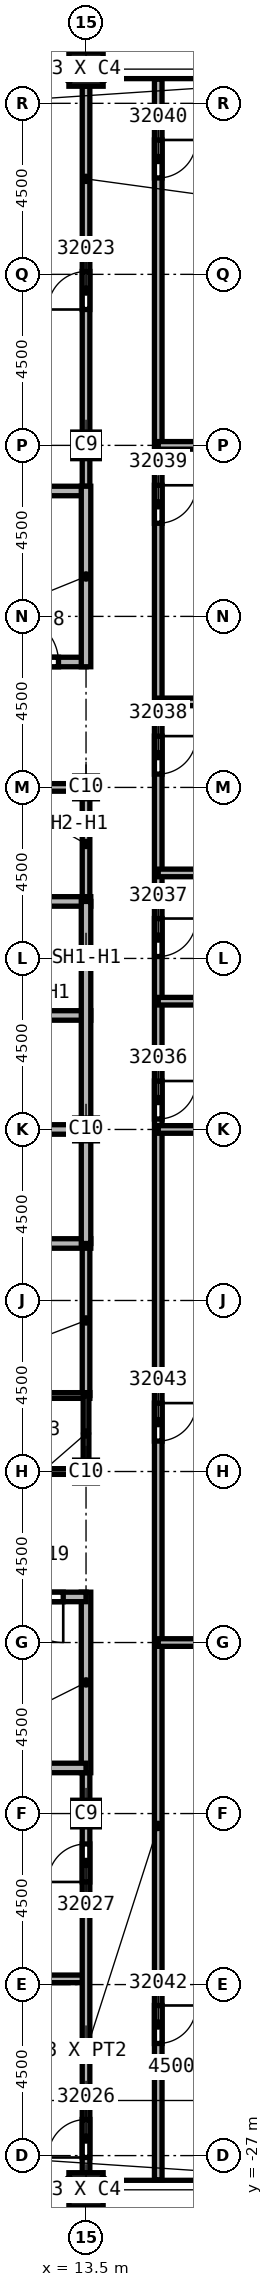
"""IFC4 building model, lengths in metres.
Left out: names, types, materials, properties, quantities, classifications, styles, units other than length and angle.
Written with IfcOpenShell. Run it as: python <this file> out.ifc"""

import sys

from ifc_helpers import new_model, si_unit, direction, frame, frame_2d, origin, origin_2d, place, context, subcontext, project, spatial, rectangle, extrude, element, fill, save


model = new_model("IFC4")
c1 = context("Model", 3, precision=1e-05, world=origin(), true_north=direction((0.0, 1.0)))
c2 = subcontext(c1, "Body", "Model", "MODEL_VIEW")
j1 = project(units=[si_unit("LENGTHUNIT", "METRE"), si_unit("PLANEANGLEUNIT", "RADIAN")], contexts=[c1])
p1 = place(None, origin())
s1 = spatial("IfcSite", under=j1, at=p1, CompositionType="ELEMENT")
p2 = place(p1, origin())
s2 = spatial("IfcBuilding", under=s1, at=p2, CompositionType="ELEMENT")
p3 = place(p2, frame((0.0, 0.0, 356.0)))
s3 = spatial("IfcBuildingStorey", under=s2, at=p3, CompositionType="ELEMENT", Elevation=356.0)
for number, where, z_axis, x_axis in (
    (1, (13.5, 18.0, 0.0), (0.0, 0.0, 1.0), (1.0, 0.0, 0.0)),
    (2, (13.5, -18.0, 0.0), (0.0, 0.0, 1.0), (1.0, 0.0, 0.0)),
):
    element("IfcColumn", number, at=place(p3, frame(where, z_axis=z_axis, x_axis=x_axis)), inside=s3, PredefinedType="COLUMN", context=c2, shape_type="SweptSolid", body=[
        extrude(rectangle(XDim=0.7, YDim=0.7, at=origin_2d()), origin(), (0.0, 0.0, 1.0), 4.6),
    ])
for number, where, z_axis, x_axis in (
    (3, (13.5, 0.0, 0.0), (0.0, 0.0, 1.0), (1.0, 0.0, 0.0)),
    (4, (13.5, 9.0, 0.0), (0.0, 0.0, 1.0), (1.0, 0.0, 0.0)),
    (5, (13.5, -9.0, 0.0), (0.0, 0.0, 1.0), (1.0, 0.0, 0.0)),
):
    element("IfcColumn", number, at=place(p3, frame(where, z_axis=z_axis, x_axis=x_axis)), inside=s3, PredefinedType="COLUMN", context=c2, shape_type="SweptSolid", body=[
        extrude(rectangle(XDim=0.6, YDim=0.6, at=origin_2d()), origin(), (0.0, 0.0, 1.0), 4.6),
    ])
for number, where, z_axis, x_axis in (
    (6, (13.5, 27.9, 0.0), (0.0, 0.0, 1.0), (1.0, 0.0, 0.0)),
    (7, (13.5, -27.9, 0.0), (0.0, 0.0, 1.0), (1.0, 0.0, 0.0)),
):
    element("IfcColumn", number, at=place(p3, frame(where, z_axis=z_axis, x_axis=x_axis)), inside=s3, PredefinedType="COLUMN", context=c2, shape_type="SweptSolid", body=[
        extrude(rectangle(XDim=0.9, YDim=0.9, at=origin_2d()), origin(), (0.0, 0.0, 1.0), 4.6),
    ])
p4 = place(p3, frame((3.0, -22.35, 0.0), z_axis=(0.0, 0.0, 1.0), x_axis=(1.0, 0.0, 0.0)))
e8 = element("IfcWall", 8, at=p4, inside=s3, PredefinedType="PARTITIONING", context=c2, shape_type="SweptSolid", body=[
    extrude(rectangle(XDim=10.5, YDim=0.2, at=frame_2d((5.25, 0.0))), origin(), (0.0, 0.0, 1.0), 4.15),
])
p5 = place(p3, frame((13.5, -27.45, 0.0), z_axis=(0.0, 0.0, 1.0), x_axis=(0.0, 1.0, 0.0)))
e9 = element("IfcWall", 9, at=p5, inside=s3, PredefinedType="PARTITIONING", context=c2, shape_type="SweptSolid", body=[
    extrude(rectangle(XDim=10.775, YDim=0.2, at=frame_2d((5.387, 0.0))), origin(), (0.0, 0.0, 1.0), 4.15),
])
p6 = place(p5, frame((0.4, 0.0, 0.0)))
e10 = element("IfcOpeningElement", 10, at=p6, cuts=e9, PredefinedType="OPENING", context=c2, shape_type="SweptSolid", body=[
    extrude(rectangle(XDim=1.0, YDim=2.1, at=frame_2d((0.5, 1.05))), frame((0.0, 0.1, 0.0), z_axis=(0.0, -1.0, 0.0), x_axis=(1.0, 0.0, 0.0)), (0.0, 0.0, 1.0), 0.2),
])
p7 = place(p5, frame((7.65, 0.0, 0.0)))
e11 = element("IfcOpeningElement", 11, at=p7, cuts=e9, PredefinedType="OPENING", context=c2, shape_type="SweptSolid", body=[
    extrude(rectangle(XDim=1.0, YDim=2.1, at=frame_2d((0.5, 1.05))), frame((0.0, 0.1, 0.0), z_axis=(0.0, -1.0, 0.0), x_axis=(1.0, 0.0, 0.0)), (0.0, 0.0, 1.0), 0.2),
])
p8 = place(p3, frame((13.5, 16.675, 0.0), z_axis=(0.0, 0.0, 1.0), x_axis=(0.0, 1.0, 0.0)))
e12 = element("IfcWall", 12, at=p8, inside=s3, PredefinedType="PARTITIONING", context=c2, shape_type="SweptSolid", body=[
    extrude(rectangle(XDim=10.775, YDim=0.2, at=frame_2d((5.387, 0.0))), origin(), (0.0, 0.0, 1.0), 4.15),
])
p9 = place(p8, frame((4.9, 0.0, 0.0)))
e13 = element("IfcOpeningElement", 13, at=p9, cuts=e12, PredefinedType="OPENING", context=c2, shape_type="SweptSolid", body=[
    extrude(rectangle(XDim=1.0, YDim=2.1, at=frame_2d((0.5, 1.05))), frame((0.0, 0.1, 0.0), z_axis=(0.0, -1.0, 0.0), x_axis=(1.0, 0.0, 0.0)), (0.0, 0.0, 1.0), 0.2),
])
p10 = place(p3, frame((15.4, 27.636, 0.0), z_axis=(0.0, 0.0, 1.0), x_axis=(0.0, -1.0, 0.0)))
e14 = element("IfcWall", 14, at=p10, inside=s3, PredefinedType="PARTITIONING", context=c2, shape_type="SweptSolid", body=[
    extrude(rectangle(XDim=55.272, YDim=0.2, at=frame_2d((27.636, 0.0))), origin(), (0.0, 0.0, 1.0), 4.15),
])
p11 = place(p10, frame((26.361, 0.0, 0.0)))
e15 = element("IfcOpeningElement", 15, at=p11, cuts=e14, PredefinedType="OPENING", context=c2, shape_type="SweptSolid", body=[
    extrude(rectangle(XDim=1.0, YDim=2.1, at=frame_2d((0.5, 1.05))), frame((0.0, 0.1, 0.0), z_axis=(0.0, -1.0, 0.0), x_axis=(1.0, 0.0, 0.0)), (0.0, 0.0, 1.0), 0.2),
])
p12 = place(p10, frame((22.086, 0.0, 0.0)))
e16 = element("IfcOpeningElement", 16, at=p12, cuts=e14, PredefinedType="OPENING", context=c2, shape_type="SweptSolid", body=[
    extrude(rectangle(XDim=1.0, YDim=2.1, at=frame_2d((0.5, 1.05))), frame((0.0, 0.1, 0.0), z_axis=(0.0, -1.0, 0.0), x_axis=(1.0, 0.0, 0.0)), (0.0, 0.0, 1.0), 0.2),
])
p13 = place(p10, frame((17.286, 0.0, 0.0)))
e17 = element("IfcOpeningElement", 17, at=p13, cuts=e14, PredefinedType="OPENING", context=c2, shape_type="SweptSolid", body=[
    extrude(rectangle(XDim=1.0, YDim=2.1, at=frame_2d((0.5, 1.05))), frame((0.0, 0.1, 0.0), z_axis=(0.0, -1.0, 0.0), x_axis=(1.0, 0.0, 0.0)), (0.0, 0.0, 1.0), 0.2),
])
p14 = place(p10, frame((10.686, 0.0, 0.0)))
e18 = element("IfcOpeningElement", 18, at=p14, cuts=e14, PredefinedType="OPENING", context=c2, shape_type="SweptSolid", body=[
    extrude(rectangle(XDim=1.0, YDim=2.1, at=frame_2d((0.5, 1.05))), frame((0.0, 0.1, 0.0), z_axis=(0.0, -1.0, 0.0), x_axis=(1.0, 0.0, 0.0)), (0.0, 0.0, 1.0), 0.2),
])
p15 = place(p10, frame((1.6, 0.0, 0.0)))
e19 = element("IfcOpeningElement", 19, at=p15, cuts=e14, PredefinedType="OPENING", context=c2, shape_type="SweptSolid", body=[
    extrude(rectangle(XDim=1.0, YDim=2.1, at=frame_2d((0.5, 1.05))), frame((0.0, 0.1, 0.0), z_axis=(0.0, -1.0, 0.0), x_axis=(1.0, 0.0, 0.0)), (0.0, 0.0, 1.0), 0.2),
])
p16 = place(p10, frame((50.686, 0.0, 0.0)))
e20 = element("IfcOpeningElement", 20, at=p16, cuts=e14, PredefinedType="OPENING", context=c2, shape_type="SweptSolid", body=[
    extrude(rectangle(XDim=1.0, YDim=2.1, at=frame_2d((0.5, 1.05))), frame((0.0, 0.1, 0.0), z_axis=(0.0, -1.0, 0.0), x_axis=(1.0, 0.0, 0.0)), (0.0, 0.0, 1.0), 0.2),
])
p17 = place(p10, frame((34.836, 0.0, 0.0)))
e21 = element("IfcOpeningElement", 21, at=p17, cuts=e14, PredefinedType="OPENING", context=c2, shape_type="SweptSolid", body=[
    extrude(rectangle(XDim=1.0, YDim=2.1, at=frame_2d((0.5, 1.05))), frame((0.0, 0.1, 0.0), z_axis=(0.0, -1.0, 0.0), x_axis=(1.0, 0.0, 0.0)), (0.0, 0.0, 1.0), 0.2),
])
p18 = place(p3, frame((15.4, -13.5, 0.0), z_axis=(0.0, 0.0, 1.0), x_axis=(1.0, 0.0, 0.0)))
e22 = element("IfcWall", 22, at=p18, inside=s3, PredefinedType="PARTITIONING", context=c2, shape_type="SweptSolid", body=[
    extrude(rectangle(XDim=11.15, YDim=0.2, at=frame_2d((5.575, 0.0))), origin(), (0.0, 0.0, 1.0), 4.15),
])
for number, where, z_axis, x_axis in (
    (23, (15.4, 3.375, 0.0), (0.0, 0.0, 1.0), (1.0, 0.0, 0.0)),
    (24, (15.4, 6.75, 0.0), (0.0, 0.0, 1.0), (1.0, 0.0, 0.0)),
    (25, (15.4, 11.25, 0.0), (0.0, 0.0, 1.0), (1.0, 0.0, 0.0)),
):
    element("IfcWall", number, at=place(p3, frame(where, z_axis=z_axis, x_axis=x_axis)), inside=s3, PredefinedType="PARTITIONING", context=c2, shape_type="SweptSolid", body=[
        extrude(rectangle(XDim=11.336, YDim=0.2, at=frame_2d((5.668, 0.0))), origin(), (0.0, 0.0, 1.0), 4.15),
    ])
p19 = place(p3, frame((15.4, 18.0, 0.0), z_axis=(0.0, 0.0, 1.0), x_axis=(1.0, 0.0, 0.0)))
e26 = element("IfcWall", 26, at=p19, inside=s3, PredefinedType="PARTITIONING", context=c2, shape_type="SweptSolid", body=[
    extrude(rectangle(XDim=4.6, YDim=0.2, at=frame_2d((2.3, 0.0))), origin(), (0.0, 0.0, 1.0), 4.15),
])
p20 = place(p3, frame((26.55, 0.0, 0.0), z_axis=(0.0, 0.0, 1.0), x_axis=(-1.0, 0.0, 0.0)))
e27 = element("IfcWall", 27, at=p20, inside=s3, PredefinedType="PARTITIONING", context=c2, shape_type="SweptSolid", body=[
    extrude(rectangle(XDim=11.15, YDim=0.2, at=frame_2d((5.575, 0.0))), origin(), (0.0, 0.0, 1.0), 4.15),
])
p21 = place(p3, frame((10.5, 9.0, 0.0), z_axis=(0.0, 0.0, 1.0), x_axis=(1.0, 0.0, 0.0)))
e28 = element("IfcWall", 28, at=p21, inside=s3, PredefinedType="SOLIDWALL", context=c2, shape_type="SweptSolid", body=[
    extrude(rectangle(XDim=3.0, YDim=0.2, at=frame_2d((1.5, 0.0))), origin(), (0.0, 0.0, 1.0), 3.838),
])
p22 = place(p3, frame((13.5, -3.0, 0.0), z_axis=(0.0, 0.0, 1.0), x_axis=(0.0, -1.0, 0.0)))
e29 = element("IfcWall", 29, at=p22, inside=s3, PredefinedType="SOLIDWALL", context=c2, shape_type="SweptSolid", body=[
    extrude(rectangle(XDim=4.0, YDim=0.2, at=frame_2d((2.0, 0.0))), origin(), (0.0, 0.0, 1.0), 3.838),
])
p23 = place(p3, frame((13.5, 9.1, 0.0), z_axis=(0.0, 0.0, 1.0), x_axis=(0.0, -1.0, 0.0)))
e30 = element("IfcWall", 30, at=p23, inside=s3, PredefinedType="SOLIDWALL", context=c2, shape_type="SweptSolid", body=[
    extrude(rectangle(XDim=3.1, YDim=0.2, at=frame_2d((1.55, 0.0))), origin(), (0.0, 0.0, 1.0), 3.838),
])
p24 = place(p3, frame((7.5, -3.0, 0.0), z_axis=(0.0, 0.0, 1.0), x_axis=(1.0, 0.0, 0.0)))
e31 = element("IfcWall", 31, at=p24, inside=s3, PredefinedType="SOLIDWALL", context=c2, shape_type="SweptSolid", body=[
    extrude(rectangle(XDim=6.125, YDim=0.25, at=frame_2d((3.062, 0.0))), origin(), (0.0, 0.0, 1.0), 4.15),
])
p25 = place(p24, frame((0.25, 0.0, 0.0)))
e32 = element("IfcOpeningElement", 32, at=p25, cuts=e31, PredefinedType="OPENING", context=c2, shape_type="SweptSolid", body=[
    extrude(rectangle(XDim=1.1, YDim=2.1, at=frame_2d((0.55, 1.05))), frame((0.0, 0.125, 0.0), z_axis=(0.0, -1.0, 0.0), x_axis=(1.0, 0.0, 0.0)), (0.0, 0.0, 1.0), 0.25),
])
p26 = place(p3, frame((7.5, 3.0, 0.0), z_axis=(0.0, 0.0, 1.0), x_axis=(1.0, 0.0, 0.0)))
e33 = element("IfcWall", 33, at=p26, inside=s3, PredefinedType="SOLIDWALL", context=c2, shape_type="SweptSolid", body=[
    extrude(rectangle(XDim=6.125, YDim=0.25, at=frame_2d((3.062, 0.0))), origin(), (0.0, 0.0, 1.0), 4.15),
])
p27 = place(p26, frame((0.25, 0.0, 0.0)))
e34 = element("IfcOpeningElement", 34, at=p27, cuts=e33, PredefinedType="OPENING", context=c2, shape_type="SweptSolid", body=[
    extrude(rectangle(XDim=1.1, YDim=2.1, at=frame_2d((0.55, 1.05))), frame((0.0, 0.125, 0.0), z_axis=(0.0, -1.0, 0.0), x_axis=(1.0, 0.0, 0.0)), (0.0, 0.0, 1.0), 0.25),
])
for number, where, z_axis, x_axis in (
    (35, (10.5, 0.0, 0.0), (0.0, 0.0, 1.0), (1.0, 0.0, 0.0)),
    (36, (10.5, 6.0, 0.0), (0.0, 0.0, 1.0), (1.0, 0.0, 0.0)),
):
    element("IfcWall", number, at=place(p3, frame(where, z_axis=z_axis, x_axis=x_axis)), inside=s3, PredefinedType="SOLIDWALL", context=c2, shape_type="SweptSolid", body=[
        extrude(rectangle(XDim=3.125, YDim=0.25, at=frame_2d((1.562, 0.0))), origin(), (0.0, 0.0, 1.0), 4.15),
    ])
p28 = place(p3, frame((13.5, 6.0, 0.0), z_axis=(0.0, 0.0, 1.0), x_axis=(0.0, -1.0, 0.0)))
e37 = element("IfcWall", 37, at=p28, inside=s3, PredefinedType="SOLIDWALL", context=c2, shape_type="SweptSolid", body=[
    extrude(rectangle(XDim=9.0, YDim=0.25, at=frame_2d((4.5, 0.0))), origin(), (0.0, 0.0, 1.0), 3.838),
])
p29 = place(p3, frame((4.375, 12.3, 0.0), z_axis=(0.0, 0.0, 1.0), x_axis=(1.0, 0.0, 0.0)))
e38 = element("IfcWall", 38, at=p29, inside=s3, PredefinedType="SOLIDWALL", context=c2, shape_type="SweptSolid", body=[
    extrude(rectangle(XDim=9.125, YDim=0.25, at=frame_2d((4.562, 0.0))), origin(), (0.0, 0.0, 1.0), 4.15),
])
p30 = place(p29, frame((7.2, 0.0, 0.0)))
e39 = element("IfcOpeningElement", 39, at=p30, cuts=e38, PredefinedType="OPENING", context=c2, shape_type="SweptSolid", body=[
    extrude(rectangle(XDim=1.2, YDim=2.1, at=frame_2d((0.6, 1.05))), frame((0.0, 0.125, 0.0), z_axis=(0.0, -1.0, 0.0), x_axis=(1.0, 0.0, 0.0)), (0.0, 0.0, 1.0), 0.25),
])
p31 = place(p3, frame((4.4, 16.8, 0.0), z_axis=(0.0, 0.0, 1.0), x_axis=(1.0, 0.0, 0.0)))
e40 = element("IfcWall", 40, at=p31, inside=s3, PredefinedType="SOLIDWALL", context=c2, shape_type="SweptSolid", body=[
    extrude(rectangle(XDim=9.1, YDim=0.25, at=frame_2d((4.55, 0.0))), origin(), (0.0, 0.0, 1.0), 4.15),
])
p32 = place(p3, frame((13.5, -16.925, 0.0), z_axis=(0.0, 0.0, 1.0), x_axis=(0.0, 1.0, 0.0)))
e41 = element("IfcWall", 41, at=p32, inside=s3, PredefinedType="SOLIDWALL", context=c2, shape_type="SweptSolid", body=[
    extrude(rectangle(XDim=4.75, YDim=0.25, at=frame_2d((2.375, 0.0))), origin(), (0.0, 0.0, 1.0), 4.15),
])
p33 = place(p3, frame((13.5, -16.8, 0.0), z_axis=(0.0, 0.0, 1.0), x_axis=(-1.0, 0.0, 0.0)))
e42 = element("IfcWall", 42, at=p33, inside=s3, PredefinedType="SOLIDWALL", context=c2, shape_type="SweptSolid", body=[
    extrude(rectangle(XDim=9.1, YDim=0.25, at=frame_2d((4.55, 0.0))), origin(), (0.0, 0.0, 1.0), 4.15),
])
p34 = place(p3, frame((13.5, -12.3, 0.0), z_axis=(0.0, 0.0, 1.0), x_axis=(-1.0, 0.0, 0.0)))
e43 = element("IfcWall", 43, at=p34, inside=s3, PredefinedType="SOLIDWALL", context=c2, shape_type="SweptSolid", body=[
    extrude(rectangle(XDim=9.125, YDim=0.25, at=frame_2d((4.562, 0.0))), origin(), (0.0, 0.0, 1.0), 4.15),
])
p35 = place(p34, frame((0.6, 0.0, 0.0)))
e44 = element("IfcOpeningElement", 44, at=p35, cuts=e43, PredefinedType="OPENING", context=c2, shape_type="SweptSolid", body=[
    extrude(rectangle(XDim=1.2, YDim=2.1, at=frame_2d((0.6, 1.05))), frame((0.0, 0.125, 0.0), z_axis=(0.0, -1.0, 0.0), x_axis=(1.0, 0.0, 0.0)), (0.0, 0.0, 1.0), 0.25),
])
p36 = place(p3, frame((13.5, 12.175, 0.0), z_axis=(0.0, 0.0, 1.0), x_axis=(0.0, 1.0, 0.0)))
e45 = element("IfcWall", 45, at=p36, inside=s3, PredefinedType="SOLIDWALL", context=c2, shape_type="SweptSolid", body=[
    extrude(rectangle(XDim=4.75, YDim=0.25, at=frame_2d((2.375, 0.0))), origin(), (0.0, 0.0, 1.0), 4.15),
])
p37 = place(p3, frame((10.5, -7.0, 0.0), z_axis=(0.0, 0.0, 1.0), x_axis=(1.0, 0.0, 0.0)))
e46 = element("IfcWall", 46, at=p37, inside=s3, PredefinedType="PARTITIONING", context=c2, shape_type="SweptSolid", body=[
    extrude(rectangle(XDim=3.1, YDim=0.15, at=frame_2d((1.55, 0.0))), origin(), (0.0, 0.0, 1.0), 4.15),
])
p38 = place(p3, frame((13.5, -9.0, 0.0), z_axis=(0.0, 0.0, 1.0), x_axis=(-1.0, 0.0, 0.0)))
e47 = element("IfcWall", 47, at=p38, inside=s3, PredefinedType="PARTITIONING", context=c2, shape_type="SweptSolid", body=[
    extrude(rectangle(XDim=3.0, YDim=0.15, at=frame_2d((1.5, 0.0))), origin(), (0.0, 0.0, 1.0), 3.838),
])
p39 = place(p38, frame((1.0, 0.0, 0.0)))
e48 = element("IfcOpeningElement", 48, at=p39, cuts=e47, PredefinedType="OPENING", context=c2, shape_type="SweptSolid", body=[
    extrude(rectangle(XDim=0.9, YDim=2.1, at=frame_2d((0.45, 1.05))), frame((0.0, 0.075, 0.0), z_axis=(0.0, -1.0, 0.0), x_axis=(1.0, 0.0, 0.0)), (0.0, 0.0, 1.0), 0.15),
])
p40 = place(p3, frame((13.5, -7.0, 0.0), z_axis=(0.0, 0.0, 1.0), x_axis=(0.0, -1.0, 0.0)))
e49 = element("IfcWall", 49, at=p40, inside=s3, PredefinedType="PARTITIONING", context=c2, shape_type="SweptSolid", body=[
    extrude(rectangle(XDim=2.075, YDim=0.15, at=frame_2d((1.038, 0.0))), origin(), (0.0, 0.0, 1.0), 3.838),
])
p41 = place(p30, origin())
e50 = element("IfcDoor", 50, at=p41, inside=s3, OperationType="SINGLE_SWING_LEFT", PredefinedType="DOOR", context=c2, shape_type="SweptSolid", body=[
    extrude(rectangle(XDim=1.2, YDim=2.1, at=frame_2d((0.6, 1.05))), frame((0.0, 0.025, 0.0), z_axis=(0.0, -1.0, 0.0), x_axis=(1.0, 0.0, 0.0)), (0.0, 0.0, 1.0), 0.05),
])
fill(e39, e50)
p42 = place(p35, origin())
e51 = element("IfcDoor", 51, at=p42, inside=s3, OperationType="SINGLE_SWING_RIGHT", PredefinedType="DOOR", context=c2, shape_type="SweptSolid", body=[
    extrude(rectangle(XDim=1.2, YDim=2.1, at=frame_2d((0.6, 1.05))), frame((0.0, 0.025, 0.0), z_axis=(0.0, -1.0, 0.0), x_axis=(1.0, 0.0, 0.0)), (0.0, 0.0, 1.0), 0.05),
])
fill(e44, e51)
p43 = place(p9, origin())
e52 = element("IfcDoor", 52, at=p43, inside=s3, OperationType="SINGLE_SWING_RIGHT", PredefinedType="DOOR", context=c2, shape_type="SweptSolid", body=[
    extrude(rectangle(XDim=1.0, YDim=2.1, at=frame_2d((0.5, 1.05))), frame((0.0, 0.025, 0.0), z_axis=(0.0, -1.0, 0.0), x_axis=(1.0, 0.0, 0.0)), (0.0, 0.0, 1.0), 0.05),
])
fill(e13, e52)
p44 = place(p6, origin())
e53 = element("IfcDoor", 53, at=p44, inside=s3, OperationType="SINGLE_SWING_LEFT", PredefinedType="DOOR", context=c2, shape_type="SweptSolid", body=[
    extrude(rectangle(XDim=1.0, YDim=2.1, at=frame_2d((0.5, 1.05))), frame((0.0, 0.025, 0.0), z_axis=(0.0, -1.0, 0.0), x_axis=(1.0, 0.0, 0.0)), (0.0, 0.0, 1.0), 0.05),
])
fill(e10, e53)
p45 = place(p7, origin())
e54 = element("IfcDoor", 54, at=p45, inside=s3, OperationType="SINGLE_SWING_RIGHT", PredefinedType="DOOR", context=c2, shape_type="SweptSolid", body=[
    extrude(rectangle(XDim=1.0, YDim=2.1, at=frame_2d((0.5, 1.05))), frame((0.0, 0.025, 0.0), z_axis=(0.0, -1.0, 0.0), x_axis=(1.0, 0.0, 0.0)), (0.0, 0.0, 1.0), 0.05),
])
fill(e11, e54)
p46 = place(p11, origin())
e55 = element("IfcDoor", 55, at=p46, inside=s3, OperationType="SINGLE_SWING_LEFT", PredefinedType="DOOR", context=c2, shape_type="SweptSolid", body=[
    extrude(rectangle(XDim=1.0, YDim=2.1, at=frame_2d((0.5, 1.05))), frame((0.0, 0.025, 0.0), z_axis=(0.0, -1.0, 0.0), x_axis=(1.0, 0.0, 0.0)), (0.0, 0.0, 1.0), 0.05),
])
fill(e15, e55)
p47 = place(p12, origin())
e56 = element("IfcDoor", 56, at=p47, inside=s3, OperationType="SINGLE_SWING_RIGHT", PredefinedType="DOOR", context=c2, shape_type="SweptSolid", body=[
    extrude(rectangle(XDim=1.0, YDim=2.1, at=frame_2d((0.5, 1.05))), frame((0.0, 0.025, 0.0), z_axis=(0.0, -1.0, 0.0), x_axis=(1.0, 0.0, 0.0)), (0.0, 0.0, 1.0), 0.05),
])
fill(e16, e56)
p48 = place(p13, origin())
e57 = element("IfcDoor", 57, at=p48, inside=s3, OperationType="SINGLE_SWING_LEFT", PredefinedType="DOOR", context=c2, shape_type="SweptSolid", body=[
    extrude(rectangle(XDim=1.0, YDim=2.1, at=frame_2d((0.5, 1.05))), frame((0.0, 0.025, 0.0), z_axis=(0.0, -1.0, 0.0), x_axis=(1.0, 0.0, 0.0)), (0.0, 0.0, 1.0), 0.05),
])
fill(e17, e57)
p49 = place(p14, origin())
e58 = element("IfcDoor", 58, at=p49, inside=s3, OperationType="SINGLE_SWING_RIGHT", PredefinedType="DOOR", context=c2, shape_type="SweptSolid", body=[
    extrude(rectangle(XDim=1.0, YDim=2.1, at=frame_2d((0.5, 1.05))), frame((0.0, 0.025, 0.0), z_axis=(0.0, -1.0, 0.0), x_axis=(1.0, 0.0, 0.0)), (0.0, 0.0, 1.0), 0.05),
])
fill(e18, e58)
p50 = place(p15, origin())
e59 = element("IfcDoor", 59, at=p50, inside=s3, OperationType="SINGLE_SWING_LEFT", PredefinedType="DOOR", context=c2, shape_type="SweptSolid", body=[
    extrude(rectangle(XDim=1.0, YDim=2.1, at=frame_2d((0.5, 1.05))), frame((0.0, 0.025, 0.0), z_axis=(0.0, -1.0, 0.0), x_axis=(1.0, 0.0, 0.0)), (0.0, 0.0, 1.0), 0.05),
])
fill(e19, e59)
p51 = place(p16, origin())
e60 = element("IfcDoor", 60, at=p51, inside=s3, OperationType="SINGLE_SWING_LEFT", PredefinedType="DOOR", context=c2, shape_type="SweptSolid", body=[
    extrude(rectangle(XDim=1.0, YDim=2.1, at=frame_2d((0.5, 1.05))), frame((0.0, 0.025, 0.0), z_axis=(0.0, -1.0, 0.0), x_axis=(1.0, 0.0, 0.0)), (0.0, 0.0, 1.0), 0.05),
])
fill(e20, e60)
p52 = place(p17, origin())
e61 = element("IfcDoor", 61, at=p52, inside=s3, OperationType="SINGLE_SWING_RIGHT", PredefinedType="DOOR", context=c2, shape_type="SweptSolid", body=[
    extrude(rectangle(XDim=1.0, YDim=2.1, at=frame_2d((0.5, 1.05))), frame((0.0, 0.025, 0.0), z_axis=(0.0, -1.0, 0.0), x_axis=(1.0, 0.0, 0.0)), (0.0, 0.0, 1.0), 0.05),
])
fill(e21, e61)
save(model, sys.argv[1])
